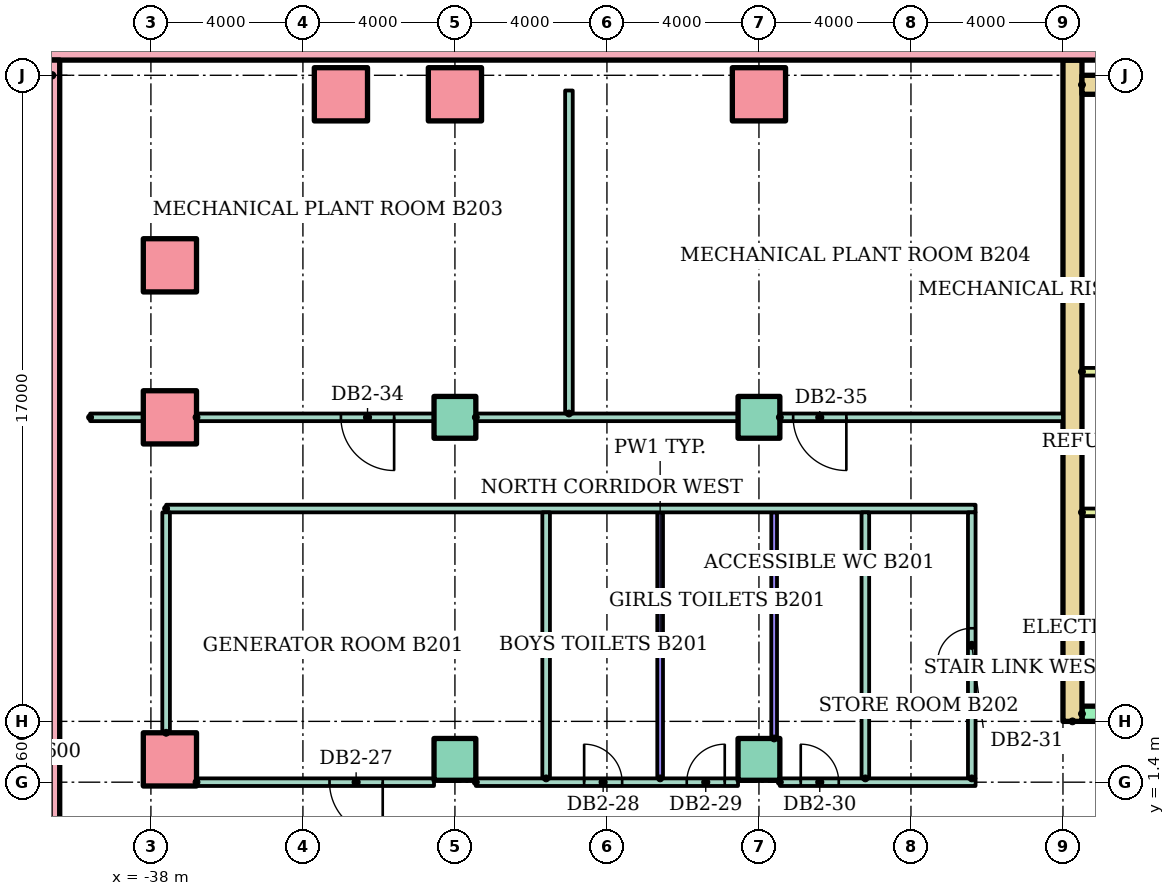
"""IFC4 building model, lengths in metres.
Left out: names, types, materials, properties, quantities, classifications, styles, units other than length and angle.
Written with IfcOpenShell. Run it as: python <this file> out.ifc"""

import sys

from ifc_helpers import new_model, si_unit, direction, frame, frame_2d, origin, origin_2d, place, context, subcontext, project, spatial, rectangle, hollow_rectangle, extrude, element, fill, save


model = new_model("IFC4")
c1 = context("Model", 3, precision=1e-05, world=origin(), true_north=direction((0.0, 1.0)))
c2 = subcontext(c1, "Body", "Model", "MODEL_VIEW")
j1 = project(units=[si_unit("LENGTHUNIT", "METRE"), si_unit("PLANEANGLEUNIT", "RADIAN")], contexts=[c1])
p1 = place(None, origin())
s1 = spatial("IfcSite", under=j1, at=p1, CompositionType="ELEMENT")
p2 = place(p1, origin())
s2 = spatial("IfcBuilding", under=s1, at=p2, CompositionType="ELEMENT")
p3 = place(p2, frame((0.0, 0.0, -10.0)))
s3 = spatial("IfcBuildingStorey", under=s2, at=p3, CompositionType="ELEMENT", Elevation=-10.0)
p4 = place(p3, frame((-41.0, 20.7, -0.3)))
e1 = element("IfcWall", 1, at=p4, inside=s3, PredefinedType="SOLIDWALL", context=c2, shape_type="SweptSolid", body=[
    extrude(rectangle(XDim=82.0, YDim=0.6, at=frame_2d((41.0, 0.0))), origin(), (0.0, 0.0, 1.0), 4.95),
])
p5 = place(p3, frame((-40.7, -50.4, -0.3), z_axis=(0.0, 0.0, 1.0), x_axis=(0.0, 1.0, 0.0)))
e2 = element("IfcWall", 2, at=p5, inside=s3, PredefinedType="SOLIDWALL", context=c2, shape_type="SweptSolid", body=[
    extrude(rectangle(XDim=70.8, YDim=0.6, at=frame_2d((35.4, 0.0))), origin(), (0.0, 0.0, 1.0), 4.95),
])
p6 = place(p3, frame((-37.5, 2.0, -0.3)))
e3 = element("IfcColumn", 3, at=p6, inside=s3, PredefinedType="COLUMN", context=c2, shape_type="SweptSolid", body=[
    extrude(hollow_rectangle(XDim=1.4, YDim=1.4, WallThickness=0.08, at=origin_2d()), origin(), (0.0, 0.0, 1.0), 5.3),
])
for number, where in (
    (4, (-30.0, 2.0, -0.3)),
    (5, (-22.0, 2.0, -0.3)),
):
    element("IfcColumn", number, at=place(p3, frame(where)), inside=s3, PredefinedType="COLUMN", context=c2, shape_type="SweptSolid", body=[
        extrude(rectangle(XDim=1.1, YDim=1.1, at=origin_2d()), origin(), (0.0, 0.0, 1.0), 5.3),
    ])
p7 = place(p3, frame((-37.5, 11.0, -0.3)))
e6 = element("IfcColumn", 6, at=p7, inside=s3, PredefinedType="COLUMN", context=c2, shape_type="SweptSolid", body=[
    extrude(hollow_rectangle(XDim=1.4, YDim=1.4, WallThickness=0.08, at=origin_2d()), origin(), (0.0, 0.0, 1.0), 5.3),
])
for number, where in (
    (7, (-30.0, 11.0, -0.3)),
    (8, (-22.0, 11.0, -0.3)),
):
    element("IfcColumn", number, at=place(p3, frame(where)), inside=s3, PredefinedType="COLUMN", context=c2, shape_type="SweptSolid", body=[
        extrude(rectangle(XDim=1.1, YDim=1.1, at=origin_2d()), origin(), (0.0, 0.0, 1.0), 5.3),
    ])
for number, where in (
    (9, (-37.5, 15.0, -0.3)),
    (10, (-33.0, 19.5, -0.3)),
    (11, (-30.0, 19.5, -0.3)),
    (12, (-22.0, 19.5, -0.3)),
):
    element("IfcColumn", number, at=place(p3, frame(where)), inside=s3, PredefinedType="COLUMN", context=c2, shape_type="SweptSolid", body=[
        extrude(hollow_rectangle(XDim=1.4, YDim=1.4, WallThickness=0.08, at=origin_2d()), origin(), (0.0, 0.0, 1.0), 5.3),
    ])
p8 = place(p3, frame((-13.75, 3.0, 0.0), z_axis=(0.0, 0.0, 1.0), x_axis=(0.0, 1.0, 0.0)))
e13 = element("IfcWall", 13, at=p8, inside=s3, PredefinedType="SHEAR", context=c2, shape_type="SweptSolid", body=[
    extrude(rectangle(XDim=17.4, YDim=0.5, at=frame_2d((8.7, 0.0))), origin(), (0.0, 0.0, 1.0), 4.65),
])
p9 = place(p3, frame((-13.5, 19.75, 0.0)))
e14 = element("IfcWall", 14, at=p9, inside=s3, PredefinedType="SHEAR", context=c2, shape_type="SweptSolid", body=[
    extrude(rectangle(XDim=27.0, YDim=0.5, at=frame_2d((13.5, 0.0))), origin(), (0.0, 0.0, 1.0), 4.65),
])
p10 = place(p3, frame((-13.5, 3.2, 0.0)))
e15 = element("IfcWall", 15, at=p10, inside=s3, PredefinedType="SHEAR", context=c2, shape_type="SweptSolid", body=[
    extrude(rectangle(XDim=27.0, YDim=0.4, at=frame_2d((13.5, 0.0))), origin(), (0.0, 0.0, 1.0), 4.65),
])
p11 = place(p10, frame((12.6, 0.0, 0.0)))
e16 = element("IfcOpeningElement", 16, at=p11, cuts=e15, PredefinedType="OPENING", context=c2, shape_type="SweptSolid", body=[
    extrude(rectangle(XDim=1.8, YDim=2.1, at=frame_2d((0.9, 1.05))), frame((0.0, 0.21, 0.0), z_axis=(0.0, -1.0, 0.0), x_axis=(1.0, 0.0, 0.0)), (0.0, 0.0, 1.0), 0.42),
])
for number, where in (
    (17, (-13.5, 8.5, 0.0)),
    (18, (-13.5, 12.2, 0.0)),
):
    element("IfcWall", number, at=place(p3, frame(where)), inside=s3, PredefinedType="PARTITIONING", context=c2, shape_type="SweptSolid", body=[
        extrude(rectangle(XDim=3.9, YDim=0.2, at=frame_2d((1.95, 0.0))), origin(), (0.0, 0.0, 1.0), 4.65),
    ])
p12 = place(p3, frame((-36.8, 1.4, 0.0)))
e19 = element("IfcWall", 19, at=p12, inside=s3, PredefinedType="PARTITIONING", context=c2, shape_type="SweptSolid", body=[
    extrude(rectangle(XDim=6.25, YDim=0.2, at=frame_2d((3.125, 0.0))), origin(), (0.0, 0.0, 1.0), 4.65),
])
p13 = place(p12, frame((3.5, 0.0, 0.0)))
e20 = element("IfcOpeningElement", 20, at=p13, cuts=e19, PredefinedType="OPENING", context=c2, shape_type="SweptSolid", body=[
    extrude(rectangle(XDim=1.4, YDim=2.1, at=frame_2d((0.7, 1.05))), frame((0.0, 0.11, 0.0), z_axis=(0.0, -1.0, 0.0), x_axis=(1.0, 0.0, 0.0)), (0.0, 0.0, 1.0), 0.22),
])
p14 = place(p3, frame((-29.45, 1.4, 0.0)))
e21 = element("IfcWall", 21, at=p14, inside=s3, PredefinedType="PARTITIONING", context=c2, shape_type="SweptSolid", body=[
    extrude(rectangle(XDim=6.9, YDim=0.2, at=frame_2d((3.45, 0.0))), origin(), (0.0, 0.0, 1.0), 4.65),
])
p15 = place(p14, frame((2.85, 0.0, 0.0)))
e22 = element("IfcOpeningElement", 22, at=p15, cuts=e21, PredefinedType="OPENING", context=c2, shape_type="SweptSolid", body=[
    extrude(rectangle(XDim=1.0, YDim=2.1, at=frame_2d((0.5, 1.05))), frame((0.0, 0.11, 0.0), z_axis=(0.0, -1.0, 0.0), x_axis=(1.0, 0.0, 0.0)), (0.0, 0.0, 1.0), 0.22),
])
p16 = place(p14, frame((5.55, 0.0, 0.0)))
e23 = element("IfcOpeningElement", 23, at=p16, cuts=e21, PredefinedType="OPENING", context=c2, shape_type="SweptSolid", body=[
    extrude(rectangle(XDim=1.0, YDim=2.1, at=frame_2d((0.5, 1.05))), frame((0.0, 0.11, 0.0), z_axis=(0.0, -1.0, 0.0), x_axis=(1.0, 0.0, 0.0)), (0.0, 0.0, 1.0), 0.22),
])
p17 = place(p3, frame((-21.45, 1.4, 0.0)))
e24 = element("IfcWall", 24, at=p17, inside=s3, PredefinedType="PARTITIONING", context=c2, shape_type="SweptSolid", body=[
    extrude(rectangle(XDim=5.15, YDim=0.2, at=frame_2d((2.575, 0.0))), origin(), (0.0, 0.0, 1.0), 4.65),
])
p18 = place(p17, frame((0.55, 0.0, 0.0)))
e25 = element("IfcOpeningElement", 25, at=p18, cuts=e24, PredefinedType="OPENING", context=c2, shape_type="SweptSolid", body=[
    extrude(rectangle(XDim=1.0, YDim=2.1, at=frame_2d((0.5, 1.05))), frame((0.0, 0.11, 0.0), z_axis=(0.0, -1.0, 0.0), x_axis=(1.0, 0.0, 0.0)), (0.0, 0.0, 1.0), 0.22),
])
p19 = place(p3, frame((-37.6, 8.6, 0.0)))
e26 = element("IfcWall", 26, at=p19, inside=s3, PredefinedType="PARTITIONING", context=c2, shape_type="SweptSolid", body=[
    extrude(rectangle(XDim=21.3, YDim=0.2, at=frame_2d((10.65, 0.0))), origin(), (0.0, 0.0, 1.0), 4.65),
])
p20 = place(p3, frame((-39.6, 11.0, 0.0)))
e27 = element("IfcWall", 27, at=p20, inside=s3, PredefinedType="PARTITIONING", context=c2, shape_type="SweptSolid", body=[
    extrude(rectangle(XDim=1.4, YDim=0.2, at=frame_2d((0.7, 0.0))), origin(), (0.0, 0.0, 1.0), 4.65),
])
p21 = place(p3, frame((-36.8, 11.0, 0.0)))
e28 = element("IfcWall", 28, at=p21, inside=s3, PredefinedType="PARTITIONING", context=c2, shape_type="SweptSolid", body=[
    extrude(rectangle(XDim=6.25, YDim=0.2, at=frame_2d((3.125, 0.0))), origin(), (0.0, 0.0, 1.0), 4.65),
])
p22 = place(p21, frame((3.8, 0.0, 0.0)))
e29 = element("IfcOpeningElement", 29, at=p22, cuts=e28, PredefinedType="OPENING", context=c2, shape_type="SweptSolid", body=[
    extrude(rectangle(XDim=1.4, YDim=2.1, at=frame_2d((0.7, 1.05))), frame((0.0, 0.11, 0.0), z_axis=(0.0, -1.0, 0.0), x_axis=(1.0, 0.0, 0.0)), (0.0, 0.0, 1.0), 0.22),
])
p23 = place(p3, frame((-29.45, 11.0, 0.0)))
e30 = element("IfcWall", 30, at=p23, inside=s3, PredefinedType="PARTITIONING", context=c2, shape_type="SweptSolid", body=[
    extrude(rectangle(XDim=6.9, YDim=0.2, at=frame_2d((3.45, 0.0))), origin(), (0.0, 0.0, 1.0), 4.65),
])
p24 = place(p3, frame((-21.45, 11.0, 0.0)))
e31 = element("IfcWall", 31, at=p24, inside=s3, PredefinedType="PARTITIONING", context=c2, shape_type="SweptSolid", body=[
    extrude(rectangle(XDim=7.45, YDim=0.2, at=frame_2d((3.725, 0.0))), origin(), (0.0, 0.0, 1.0), 4.65),
])
p25 = place(p24, frame((0.35, 0.0, 0.0)))
e32 = element("IfcOpeningElement", 32, at=p25, cuts=e31, PredefinedType="OPENING", context=c2, shape_type="SweptSolid", body=[
    extrude(rectangle(XDim=1.4, YDim=2.1, at=frame_2d((0.7, 1.05))), frame((0.0, 0.11, 0.0), z_axis=(0.0, -1.0, 0.0), x_axis=(1.0, 0.0, 0.0)), (0.0, 0.0, 1.0), 0.22),
])
p26 = place(p3, frame((-37.6, 2.7, 0.0), z_axis=(0.0, 0.0, 1.0), x_axis=(0.0, 1.0, 0.0)))
e33 = element("IfcWall", 33, at=p26, inside=s3, PredefinedType="PARTITIONING", context=c2, shape_type="SweptSolid", body=[
    extrude(rectangle(XDim=5.8, YDim=0.2, at=frame_2d((2.9, 0.0))), origin(), (0.0, 0.0, 1.0), 4.65),
])
p27 = place(p3, frame((-27.6, 1.5, 0.0), z_axis=(0.0, 0.0, 1.0), x_axis=(0.0, 1.0, 0.0)))
e34 = element("IfcWall", 34, at=p27, inside=s3, PredefinedType="PARTITIONING", context=c2, shape_type="SweptSolid", body=[
    extrude(rectangle(XDim=7.0, YDim=0.2, at=frame_2d((3.5, 0.0))), origin(), (0.0, 0.0, 1.0), 4.65),
])
p28 = place(p3, frame((-27.0, 11.1, 0.0), z_axis=(0.0, 0.0, 1.0), x_axis=(0.0, 1.0, 0.0)))
e35 = element("IfcWall", 35, at=p28, inside=s3, PredefinedType="PARTITIONING", context=c2, shape_type="SweptSolid", body=[
    extrude(rectangle(XDim=8.5, YDim=0.2, at=frame_2d((4.25, 0.0))), origin(), (0.0, 0.0, 1.0), 4.65),
])
p29 = place(p3, frame((-24.6, 1.5, 0.0), z_axis=(0.0, 0.0, 1.0), x_axis=(0.0, 1.0, 0.0)))
e36 = element("IfcWall", 36, at=p29, inside=s3, PredefinedType="PARTITIONING", context=c2, shape_type="SweptSolid", body=[
    extrude(rectangle(XDim=7.0, YDim=0.15, at=frame_2d((3.5, 0.0))), origin(), (0.0, 0.0, 1.0), 4.65),
])
p30 = place(p3, frame((-21.6, 2.55, 0.0), z_axis=(0.0, 0.0, 1.0), x_axis=(0.0, 1.0, 0.0)))
e37 = element("IfcWall", 37, at=p30, inside=s3, PredefinedType="PARTITIONING", context=c2, shape_type="SweptSolid", body=[
    extrude(rectangle(XDim=5.95, YDim=0.15, at=frame_2d((2.975, 0.0))), origin(), (0.0, 0.0, 1.0), 4.65),
])
p31 = place(p3, frame((-19.2, 1.5, 0.0), z_axis=(0.0, 0.0, 1.0), x_axis=(0.0, 1.0, 0.0)))
e38 = element("IfcWall", 38, at=p31, inside=s3, PredefinedType="PARTITIONING", context=c2, shape_type="SweptSolid", body=[
    extrude(rectangle(XDim=7.0, YDim=0.2, at=frame_2d((3.5, 0.0))), origin(), (0.0, 0.0, 1.0), 4.65),
])
p32 = place(p3, frame((-16.4, 1.5, 0.0), z_axis=(0.0, 0.0, 1.0), x_axis=(0.0, 1.0, 0.0)))
e39 = element("IfcWall", 39, at=p32, inside=s3, PredefinedType="PARTITIONING", context=c2, shape_type="SweptSolid", body=[
    extrude(rectangle(XDim=7.0, YDim=0.2, at=frame_2d((3.5, 0.0))), origin(), (0.0, 0.0, 1.0), 4.65),
])
p33 = place(p32, frame((3.05, 0.0, 0.0)))
e40 = element("IfcOpeningElement", 40, at=p33, cuts=e39, PredefinedType="OPENING", context=c2, shape_type="SweptSolid", body=[
    extrude(rectangle(XDim=0.9, YDim=2.1, at=frame_2d((0.45, 1.05))), frame((0.0, 0.11, 0.0), z_axis=(0.0, -1.0, 0.0), x_axis=(1.0, 0.0, 0.0)), (0.0, 0.0, 1.0), 0.22),
])
p34 = place(p13, frame((1.4, 0.0, 0.0), z_axis=(0.0, 0.0, 1.0), x_axis=(-1.0, 0.0, 0.0)))
e41 = element("IfcDoor", 41, at=p34, inside=s3, OperationType="DOUBLE_DOOR_SINGLE_SWING", PredefinedType="DOOR", context=c2, shape_type="SweptSolid", body=[
    extrude(rectangle(XDim=1.4, YDim=2.1, at=frame_2d((0.7, 1.05))), frame((0.0, 0.025, 0.0), z_axis=(0.0, -1.0, 0.0), x_axis=(1.0, 0.0, 0.0)), (0.0, 0.0, 1.0), 0.05),
])
fill(e20, e41)
p35 = place(p15, origin())
e42 = element("IfcDoor", 42, at=p35, inside=s3, OperationType="SINGLE_SWING_LEFT", PredefinedType="DOOR", context=c2, shape_type="SweptSolid", body=[
    extrude(rectangle(XDim=1.0, YDim=2.1, at=frame_2d((0.5, 1.05))), frame((0.0, 0.025, 0.0), z_axis=(0.0, -1.0, 0.0), x_axis=(1.0, 0.0, 0.0)), (0.0, 0.0, 1.0), 0.05),
])
fill(e22, e42)
p36 = place(p16, origin())
e43 = element("IfcDoor", 43, at=p36, inside=s3, OperationType="SINGLE_SWING_RIGHT", PredefinedType="DOOR", context=c2, shape_type="SweptSolid", body=[
    extrude(rectangle(XDim=1.0, YDim=2.1, at=frame_2d((0.5, 1.05))), frame((0.0, 0.025, 0.0), z_axis=(0.0, -1.0, 0.0), x_axis=(1.0, 0.0, 0.0)), (0.0, 0.0, 1.0), 0.05),
])
fill(e23, e43)
p37 = place(p18, origin())
e44 = element("IfcDoor", 44, at=p37, inside=s3, OperationType="SINGLE_SWING_LEFT", PredefinedType="DOOR", context=c2, shape_type="SweptSolid", body=[
    extrude(rectangle(XDim=1.0, YDim=2.1, at=frame_2d((0.5, 1.05))), frame((0.0, 0.025, 0.0), z_axis=(0.0, -1.0, 0.0), x_axis=(1.0, 0.0, 0.0)), (0.0, 0.0, 1.0), 0.05),
])
fill(e25, e44)
p38 = place(p33, origin())
e45 = element("IfcDoor", 45, at=p38, inside=s3, OperationType="SINGLE_SWING_LEFT", PredefinedType="DOOR", context=c2, shape_type="SweptSolid", body=[
    extrude(rectangle(XDim=0.9, YDim=2.1, at=frame_2d((0.45, 1.05))), frame((0.0, 0.025, 0.0), z_axis=(0.0, -1.0, 0.0), x_axis=(1.0, 0.0, 0.0)), (0.0, 0.0, 1.0), 0.05),
])
fill(e40, e45)
p39 = place(p22, frame((1.4, 0.0, 0.0), z_axis=(0.0, 0.0, 1.0), x_axis=(-1.0, 0.0, 0.0)))
e46 = element("IfcDoor", 46, at=p39, inside=s3, OperationType="DOUBLE_DOOR_SINGLE_SWING", PredefinedType="DOOR", context=c2, shape_type="SweptSolid", body=[
    extrude(rectangle(XDim=1.4, YDim=2.1, at=frame_2d((0.7, 1.05))), frame((0.0, 0.025, 0.0), z_axis=(0.0, -1.0, 0.0), x_axis=(1.0, 0.0, 0.0)), (0.0, 0.0, 1.0), 0.05),
])
fill(e29, e46)
p40 = place(p25, frame((1.4, 0.0, 0.0), z_axis=(0.0, 0.0, 1.0), x_axis=(-1.0, 0.0, 0.0)))
e47 = element("IfcDoor", 47, at=p40, inside=s3, OperationType="DOUBLE_DOOR_SINGLE_SWING", PredefinedType="DOOR", context=c2, shape_type="SweptSolid", body=[
    extrude(rectangle(XDim=1.4, YDim=2.1, at=frame_2d((0.7, 1.05))), frame((0.0, 0.025, 0.0), z_axis=(0.0, -1.0, 0.0), x_axis=(1.0, 0.0, 0.0)), (0.0, 0.0, 1.0), 0.05),
])
fill(e32, e47)
save(model, sys.argv[1])
